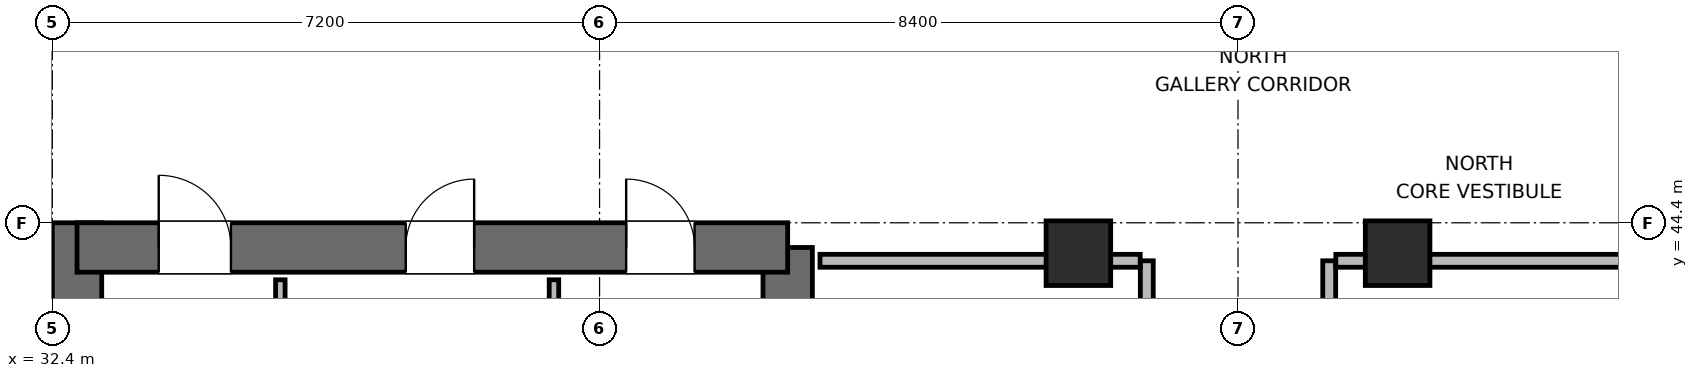
"""IFC4 building model, lengths in metres.
Left out: names, types, materials, properties, quantities, classifications, styles, units other than length and angle.
Written with IfcOpenShell. Run it as: python <this file> out.ifc"""

import sys

from ifc_helpers import new_model, si_unit, direction, frame, frame_2d, origin, origin_2d, place, context, subcontext, project, spatial, rectangle, extrude, element, fill, save


model = new_model("IFC4")
c1 = context("Model", 3, precision=1e-05, world=origin(), true_north=direction((0.0, 1.0)))
c2 = subcontext(c1, "Body", "Model", "MODEL_VIEW")
j1 = project(units=[si_unit("LENGTHUNIT", "METRE"), si_unit("PLANEANGLEUNIT", "RADIAN")], contexts=[c1])
p1 = place(None, origin())
s1 = spatial("IfcSite", under=j1, at=p1, CompositionType="ELEMENT")
p2 = place(p1, origin())
s2 = spatial("IfcBuilding", under=s1, at=p2, CompositionType="ELEMENT")
p3 = place(p2, frame((0.0, 0.0, 258.9)))
s3 = spatial("IfcBuildingStorey", under=s2, at=p3, CompositionType="ELEMENT", Elevation=258.9)
p4 = place(p3, frame((32.725, 27.6, 0.0), z_axis=(0.0, 0.0, 1.0), x_axis=(0.0, 1.0, 0.0)))
e1 = element("IfcWall", 1, at=p4, inside=s3, PredefinedType="SHEAR", context=c2, shape_type="SweptSolid", body=[
    extrude(rectangle(XDim=16.8, YDim=0.65, at=frame_2d((8.4, 0.0))), origin(), (0.0, 0.0, 1.0), 3.9),
])
p5 = place(p3, frame((42.075, 37.8, 0.0), z_axis=(0.0, 0.0, 1.0), x_axis=(0.0, 1.0, 0.0)))
e2 = element("IfcWall", 2, at=p5, inside=s3, PredefinedType="SHEAR", context=c2, shape_type="SweptSolid", body=[
    extrude(rectangle(XDim=6.275, YDim=0.65, at=frame_2d((3.137, 0.0))), origin(), (0.0, 0.0, 1.0), 3.9),
])
p6 = place(p3, frame((32.725, 44.075, 0.0), z_axis=(0.0, 0.0, 1.0), x_axis=(1.0, 0.0, 0.0)))
e3 = element("IfcWall", 3, at=p6, inside=s3, PredefinedType="SHEAR", context=c2, shape_type="SweptSolid", body=[
    extrude(rectangle(XDim=9.35, YDim=0.65, at=frame_2d((4.675, 0.0))), origin(), (0.0, 0.0, 1.0), 3.9),
])
p7 = place(p6, frame((1.075, 0.0, 0.0)))
e4 = element("IfcOpeningElement", 4, at=p7, cuts=e3, PredefinedType="OPENING", context=c2, shape_type="SweptSolid", body=[
    extrude(rectangle(XDim=0.95, YDim=2.04, at=frame_2d((0.475, 1.02))), frame((0.0, 0.335, 0.0), z_axis=(0.0, -1.0, 0.0), x_axis=(1.0, 0.0, 0.0)), (0.0, 0.0, 1.0), 0.67),
])
p8 = place(p6, frame((4.325, 0.0, 0.0)))
e5 = element("IfcOpeningElement", 5, at=p8, cuts=e3, PredefinedType="OPENING", context=c2, shape_type="SweptSolid", body=[
    extrude(rectangle(XDim=0.9, YDim=2.02, at=frame_2d((0.45, 1.01))), frame((0.0, 0.335, 0.0), z_axis=(0.0, -1.0, 0.0), x_axis=(1.0, 0.0, 0.0)), (0.0, 0.0, 1.0), 0.67),
])
p9 = place(p6, frame((7.225, 0.0, 0.0)))
e6 = element("IfcOpeningElement", 6, at=p9, cuts=e3, PredefinedType="OPENING", context=c2, shape_type="SweptSolid", body=[
    extrude(rectangle(XDim=0.9, YDim=2.02, at=frame_2d((0.45, 1.01))), frame((0.0, 0.335, 0.0), z_axis=(0.0, -1.0, 0.0), x_axis=(1.0, 0.0, 0.0)), (0.0, 0.0, 1.0), 0.67),
])
for number, where, z_axis, x_axis in (
    (7, (45.9, 44.0, 0.0), (0.0, 0.0, 1.0), (1.0, 0.0, 0.0)),
    (8, (50.1, 44.0, 0.0), (0.0, 0.0, 1.0), (1.0, 0.0, 0.0)),
):
    element("IfcColumn", number, at=place(p3, frame(where, z_axis=z_axis, x_axis=x_axis)), inside=s3, PredefinedType="COLUMN", context=c2, shape_type="SweptSolid", body=[
        extrude(rectangle(XDim=0.85, YDim=0.85, at=origin_2d()), origin(), (0.0, 0.0, 1.0), 3.9),
    ])
for number, where, z_axis, x_axis in (
    (9, (35.4, 41.095, 0.0), (0.0, 0.0, 1.0), (0.0, 1.0, 0.0)),
    (10, (39.0, 41.095, 0.0), (0.0, 0.0, 1.0), (0.0, 1.0, 0.0)),
):
    element("IfcWall", number, at=place(p3, frame(where, z_axis=z_axis, x_axis=x_axis)), inside=s3, PredefinedType="PARTITIONING", context=c2, shape_type="SweptSolid", body=[
        extrude(rectangle(XDim=2.555, YDim=0.125, at=frame_2d((1.277, 0.0))), origin(), (0.0, 0.0, 1.0), 3.68),
    ])
p10 = place(p3, frame((46.8, 37.9, 0.0), z_axis=(0.0, 0.0, 1.0), x_axis=(0.0, 1.0, 0.0)))
e11 = element("IfcWall", 11, at=p10, inside=s3, PredefinedType="PARTITIONING", context=c2, shape_type="SweptSolid", body=[
    extrude(rectangle(XDim=6.0, YDim=0.17, at=frame_2d((3.0, 0.0))), origin(), (0.0, 0.0, 1.0), 3.68),
])
p11 = place(p10, frame((1.47, 0.0, 0.0)))
e12 = element("IfcOpeningElement", 12, at=p11, cuts=e11, PredefinedType="OPENING", context=c2, shape_type="SweptSolid", body=[
    extrude(rectangle(XDim=0.9, YDim=2.02, at=frame_2d((0.45, 1.01))), frame((0.0, 0.095, 0.0), z_axis=(0.0, -1.0, 0.0), x_axis=(1.0, 0.0, 0.0)), (0.0, 0.0, 1.0), 0.19),
])
p12 = place(p10, frame((4.47, 0.0, 0.0)))
e13 = element("IfcOpeningElement", 13, at=p12, cuts=e11, PredefinedType="OPENING", context=c2, shape_type="SweptSolid", body=[
    extrude(rectangle(XDim=0.9, YDim=2.02, at=frame_2d((0.45, 1.01))), frame((0.0, 0.095, 0.0), z_axis=(0.0, -1.0, 0.0), x_axis=(1.0, 0.0, 0.0)), (0.0, 0.0, 1.0), 0.19),
])
p13 = place(p3, frame((42.5, 43.9, 0.0), z_axis=(0.0, 0.0, 1.0), x_axis=(1.0, 0.0, 0.0)))
e14 = element("IfcWall", 14, at=p13, inside=s3, PredefinedType="PARTITIONING", context=c2, shape_type="SweptSolid", body=[
    extrude(rectangle(XDim=4.213, YDim=0.17, at=frame_2d((2.106, 0.0))), origin(), (0.0, 0.0, 1.0), 2.765),
])
p14 = place(p3, frame((49.2, 37.9, 0.0), z_axis=(0.0, 0.0, 1.0), x_axis=(0.0, 1.0, 0.0)))
e15 = element("IfcWall", 15, at=p14, inside=s3, PredefinedType="PARTITIONING", context=c2, shape_type="SweptSolid", body=[
    extrude(rectangle(XDim=6.0, YDim=0.17, at=frame_2d((3.0, 0.0))), origin(), (0.0, 0.0, 1.0), 3.68),
])
p15 = place(p14, frame((2.55, 0.0, 0.0)))
e16 = element("IfcOpeningElement", 16, at=p15, cuts=e15, PredefinedType="OPENING", context=c2, shape_type="SweptSolid", body=[
    extrude(rectangle(XDim=0.9, YDim=2.02, at=frame_2d((0.45, 1.01))), frame((0.0, 0.095, 0.0), z_axis=(0.0, -1.0, 0.0), x_axis=(1.0, 0.0, 0.0)), (0.0, 0.0, 1.0), 0.19),
])
p16 = place(p3, frame((49.287, 43.9, 0.0), z_axis=(0.0, 0.0, 1.0), x_axis=(1.0, 0.0, 0.0)))
e17 = element("IfcWall", 17, at=p16, inside=s3, PredefinedType="PARTITIONING", context=c2, shape_type="SweptSolid", body=[
    extrude(rectangle(XDim=4.113, YDim=0.17, at=frame_2d((2.056, 0.0))), origin(), (0.0, 0.0, 1.0), 2.765),
])
p17 = place(p7, origin())
e18 = element("IfcDoor", 18, at=p17, inside=s3, OperationType="SINGLE_SWING_LEFT", PredefinedType="DOOR", context=c2, shape_type="SweptSolid", body=[
    extrude(rectangle(XDim=0.95, YDim=2.04, at=frame_2d((0.475, 1.02))), frame((0.0, 0.025, 0.0), z_axis=(0.0, -1.0, 0.0), x_axis=(1.0, 0.0, 0.0)), (0.0, 0.0, 1.0), 0.05),
])
fill(e4, e18)
p18 = place(p8, origin())
e19 = element("IfcDoor", 19, at=p18, inside=s3, OperationType="SINGLE_SWING_RIGHT", PredefinedType="DOOR", context=c2, shape_type="SweptSolid", body=[
    extrude(rectangle(XDim=0.9, YDim=2.02, at=frame_2d((0.45, 1.01))), frame((0.0, 0.025, 0.0), z_axis=(0.0, -1.0, 0.0), x_axis=(1.0, 0.0, 0.0)), (0.0, 0.0, 1.0), 0.05),
])
fill(e5, e19)
p19 = place(p9, origin())
e20 = element("IfcDoor", 20, at=p19, inside=s3, OperationType="SINGLE_SWING_LEFT", PredefinedType="DOOR", context=c2, shape_type="SweptSolid", body=[
    extrude(rectangle(XDim=0.9, YDim=2.02, at=frame_2d((0.45, 1.01))), frame((0.0, 0.025, 0.0), z_axis=(0.0, -1.0, 0.0), x_axis=(1.0, 0.0, 0.0)), (0.0, 0.0, 1.0), 0.05),
])
fill(e6, e20)
save(model, sys.argv[1])
